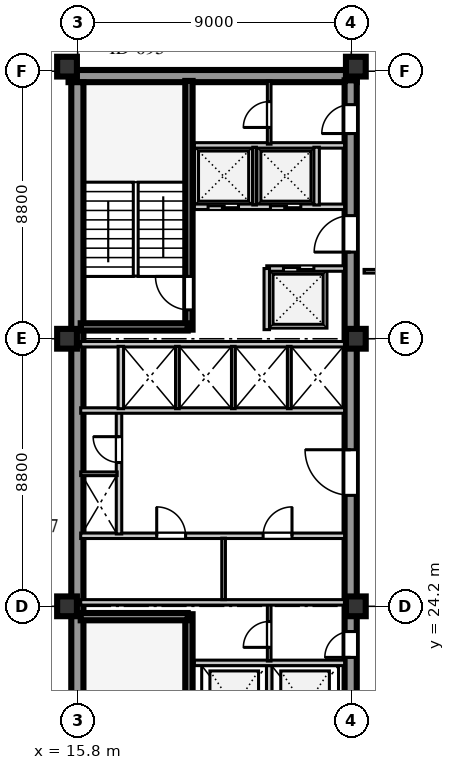
"""IFC4 building model, lengths in metres.
Left out: names, types, materials, properties, quantities, classifications, styles, units other than length and angle.
Written with IfcOpenShell. Run it as: python <this file> out.ifc"""

import sys

from ifc_helpers import new_model, si_unit, direction, frame, frame_2d, origin, origin_2d, place, context, subcontext, project, spatial, rectangle, extrude, element, fill, save


model = new_model("IFC4")
c1 = context("Model", 3, precision=1e-05, world=origin(), true_north=direction((0.0, 1.0)))
c2 = subcontext(c1, "Body", "Model", "MODEL_VIEW")
j1 = project(units=[si_unit("LENGTHUNIT", "METRE"), si_unit("PLANEANGLEUNIT", "RADIAN")], contexts=[c1])
p1 = place(None, origin())
s1 = spatial("IfcSite", under=j1, at=p1, CompositionType="ELEMENT")
p2 = place(p1, origin())
s2 = spatial("IfcBuilding", under=s1, at=p2, CompositionType="ELEMENT")
p3 = place(p2, frame((0.0, 0.0, 214.1)))
s3 = spatial("IfcBuildingStorey", under=s2, at=p3, CompositionType="ELEMENT", Elevation=214.1)
p4 = place(p3, frame((15.5, 41.64, 0.0), z_axis=(0.0, 0.0, 1.0), x_axis=(1.0, 0.0, 0.0)))
e1 = element("IfcWall", 1, at=p4, inside=s3, PredefinedType="SHEAR", context=c2, shape_type="SweptSolid", body=[
    extrude(rectangle(XDim=9.48, YDim=0.4, at=frame_2d((4.74, 0.0))), origin(), (0.0, 0.0, 1.0), 3.66),
])
p5 = place(p3, frame((15.79, 15.81, 0.0), z_axis=(0.0, 0.0, 1.0), x_axis=(0.0, 1.0, 0.0)))
e2 = element("IfcWall", 2, at=p5, inside=s3, PredefinedType="SHEAR", context=c2, shape_type="SweptSolid", body=[
    extrude(rectangle(XDim=25.63, YDim=0.4, at=frame_2d((12.815, 0.0))), origin(), (0.0, 0.0, 1.0), 3.66),
])
p6 = place(p3, frame((24.78, 15.74, 0.0), z_axis=(0.0, 0.0, 1.0), x_axis=(0.0, 1.0, 0.0)))
e3 = element("IfcWall", 3, at=p6, inside=s3, PredefinedType="SHEAR", context=c2, shape_type="SweptSolid", body=[
    extrude(rectangle(XDim=25.76, YDim=0.4, at=frame_2d((12.88, 0.0))), origin(), (0.0, 0.0, 1.0), 3.66),
])
p7 = place(p6, frame((1.61, 0.0, 0.0)))
e4 = element("IfcOpeningElement", 4, at=p7, cuts=e3, PredefinedType="OPENING", context=c2, shape_type="SweptSolid", body=[
    extrude(rectangle(XDim=1.2, YDim=2.1, at=frame_2d((0.6, 1.05))), frame((0.0, 0.21, 0.0), z_axis=(0.0, -1.0, 0.0), x_axis=(1.0, 0.0, 0.0)), (0.0, 0.0, 1.0), 0.42),
])
p8 = place(p6, frame((6.78, 0.0, 0.0)))
e5 = element("IfcOpeningElement", 5, at=p8, cuts=e3, PredefinedType="OPENING", context=c2, shape_type="SweptSolid", body=[
    extrude(rectangle(XDim=0.85, YDim=2.06, at=frame_2d((0.425, 1.03))), frame((0.0, 0.21, 0.0), z_axis=(0.0, -1.0, 0.0), x_axis=(1.0, 0.0, 0.0)), (0.0, 0.0, 1.0), 0.42),
])
p9 = place(p6, frame((12.11, 0.0, 0.0)))
e6 = element("IfcOpeningElement", 6, at=p9, cuts=e3, PredefinedType="OPENING", context=c2, shape_type="SweptSolid", body=[
    extrude(rectangle(XDim=1.5, YDim=2.12, at=frame_2d((0.75, 1.06))), frame((0.0, 0.21, 0.0), z_axis=(0.0, -1.0, 0.0), x_axis=(1.0, 0.0, 0.0)), (0.0, 0.0, 1.0), 0.42),
])
p10 = place(p6, frame((20.11, 0.0, 0.0)))
e7 = element("IfcOpeningElement", 7, at=p10, cuts=e3, PredefinedType="OPENING", context=c2, shape_type="SweptSolid", body=[
    extrude(rectangle(XDim=1.2, YDim=2.12, at=frame_2d((0.6, 1.06))), frame((0.0, 0.21, 0.0), z_axis=(0.0, -1.0, 0.0), x_axis=(1.0, 0.0, 0.0)), (0.0, 0.0, 1.0), 0.42),
])
p11 = place(p6, frame((24.01, 0.0, 0.0)))
e8 = element("IfcOpeningElement", 8, at=p11, cuts=e3, PredefinedType="OPENING", context=c2, shape_type="SweptSolid", body=[
    extrude(rectangle(XDim=0.95, YDim=2.1, at=frame_2d((0.475, 1.05))), frame((0.0, 0.21, 0.0), z_axis=(0.0, -1.0, 0.0), x_axis=(1.0, 0.0, 0.0)), (0.0, 0.0, 1.0), 0.42),
])
for number, where, z_axis, x_axis in (
    (9, (15.45, 24.2, 0.0), (0.0, 0.0, 1.0), (1.0, 0.0, 0.0)),
    (10, (15.45, 33.0, 0.0), (0.0, 0.0, 1.0), (1.0, 0.0, 0.0)),
    (11, (15.45, 41.95, 0.0), (0.0, 0.0, 1.0), (1.0, 0.0, 0.0)),
    (12, (24.95, 24.2, 0.0), (0.0, 0.0, 1.0), (1.0, 0.0, 0.0)),
    (13, (24.95, 33.0, 0.0), (0.0, 0.0, 1.0), (1.0, 0.0, 0.0)),
    (14, (24.95, 41.95, 0.0), (0.0, 0.0, 1.0), (1.0, 0.0, 0.0)),
):
    element("IfcColumn", number, at=place(p3, frame(where, z_axis=z_axis, x_axis=x_axis)), inside=s3, PredefinedType="COLUMN", context=c2, shape_type="SweptSolid", body=[
        extrude(rectangle(XDim=0.65, YDim=0.65, at=origin_2d()), origin(), (0.0, 0.0, 1.0), 3.66),
    ])
p12 = place(p3, frame((19.46, 15.74, 0.0), z_axis=(0.0, 0.0, 1.0), x_axis=(0.0, 1.0, 0.0)))
e15 = element("IfcWall", 15, at=p12, inside=s3, PredefinedType="SHEAR", context=c2, shape_type="SweptSolid", body=[
    extrude(rectangle(XDim=8.2, YDim=0.24, at=frame_2d((4.1, 0.0))), origin(), (0.0, 0.0, 1.0), 3.9),
])
p13 = place(p12, frame((0.45, 0.0, 0.0)))
e16 = element("IfcOpeningElement", 16, at=p13, cuts=e15, PredefinedType="OPENING", context=c2, shape_type="SweptSolid", body=[
    extrude(rectangle(XDim=1.1, YDim=2.1, at=frame_2d((0.55, 1.05))), frame((0.0, 0.13, 0.0), z_axis=(0.0, -1.0, 0.0), x_axis=(1.0, 0.0, 0.0)), (0.0, 0.0, 1.0), 0.26),
])
p14 = place(p3, frame((15.9, 23.86, 0.0), z_axis=(0.0, 0.0, 1.0), x_axis=(1.0, 0.0, 0.0)))
e17 = element("IfcWall", 17, at=p14, inside=s3, PredefinedType="SHEAR", context=c2, shape_type="SweptSolid", body=[
    extrude(rectangle(XDim=3.52, YDim=0.24, at=frame_2d((1.76, 0.0))), origin(), (0.0, 0.0, 1.0), 3.9),
])
p15 = place(p3, frame((22.1, 19.51, 0.0), z_axis=(0.0, 0.0, 1.0), x_axis=(0.0, 1.0, 0.0)))
e18 = element("IfcWall", 18, at=p15, inside=s3, PredefinedType="SOLIDWALL", context=c2, shape_type="SweptSolid", body=[
    extrude(rectangle(XDim=2.74, YDim=0.18, at=frame_2d((1.37, 0.0))), origin(), (0.0, 0.0, 1.0), 3.66),
])
p16 = place(p3, frame((19.64, 22.34, 0.0), z_axis=(0.0, 0.0, 1.0), x_axis=(1.0, 0.0, 0.0)))
e19 = element("IfcWall", 19, at=p16, inside=s3, PredefinedType="SOLIDWALL", context=c2, shape_type="SweptSolid", body=[
    extrude(rectangle(XDim=4.94, YDim=0.18, at=frame_2d((2.47, 0.0))), origin(), (0.0, 0.0, 1.0), 3.66),
])
p17 = place(p3, frame((22.1, 22.4, 0.0), z_axis=(0.0, 0.0, 1.0), x_axis=(0.0, 1.0, 0.0)))
e20 = element("IfcWall", 20, at=p17, inside=s3, PredefinedType="PARTITIONING", context=c2, shape_type="SweptSolid", body=[
    extrude(rectangle(XDim=1.88, YDim=0.12, at=frame_2d((0.94, 0.0))), origin(), (0.0, 0.0, 1.0), 3.66),
])
p18 = place(p17, frame((0.45, 0.0, 0.0)))
e21 = element("IfcOpeningElement", 21, at=p18, cuts=e20, PredefinedType="OPENING", context=c2, shape_type="SweptSolid", body=[
    extrude(rectangle(XDim=0.85, YDim=2.06, at=frame_2d((0.425, 1.03))), frame((0.0, 0.07, 0.0), z_axis=(0.0, -1.0, 0.0), x_axis=(1.0, 0.0, 0.0)), (0.0, 0.0, 1.0), 0.14),
])
p19 = place(p3, frame((15.9, 26.52, 0.0), z_axis=(0.0, 0.0, 1.0), x_axis=(1.0, 0.0, 0.0)))
e22 = element("IfcWall", 22, at=p19, inside=s3, PredefinedType="SOLIDWALL", context=c2, shape_type="SweptSolid", body=[
    extrude(rectangle(XDim=8.68, YDim=0.18, at=frame_2d((4.34, 0.0))), origin(), (0.0, 0.0, 1.0), 3.66),
])
p20 = place(p19, frame((2.5, 0.0, 0.0)))
e23 = element("IfcOpeningElement", 23, at=p20, cuts=e22, PredefinedType="OPENING", context=c2, shape_type="SweptSolid", body=[
    extrude(rectangle(XDim=0.95, YDim=2.1, at=frame_2d((0.475, 1.05))), frame((0.0, 0.1, 0.0), z_axis=(0.0, -1.0, 0.0), x_axis=(1.0, 0.0, 0.0)), (0.0, 0.0, 1.0), 0.2),
])
p21 = place(p19, frame((6.0, 0.0, 0.0)))
e24 = element("IfcOpeningElement", 24, at=p21, cuts=e22, PredefinedType="OPENING", context=c2, shape_type="SweptSolid", body=[
    extrude(rectangle(XDim=0.95, YDim=2.1, at=frame_2d((0.475, 1.05))), frame((0.0, 0.1, 0.0), z_axis=(0.0, -1.0, 0.0), x_axis=(1.0, 0.0, 0.0)), (0.0, 0.0, 1.0), 0.2),
])
p22 = place(p3, frame((15.9, 24.33, 0.0), z_axis=(0.0, 0.0, 1.0), x_axis=(1.0, 0.0, 0.0)))
e25 = element("IfcWall", 25, at=p22, inside=s3, PredefinedType="SOLIDWALL", context=c2, shape_type="SweptSolid", body=[
    extrude(rectangle(XDim=8.68, YDim=0.18, at=frame_2d((4.34, 0.0))), origin(), (0.0, 0.0, 1.0), 3.06),
])
p23 = place(p3, frame((20.6, 24.42, 0.0), z_axis=(0.0, 0.0, 1.0), x_axis=(0.0, 1.0, 0.0)))
e26 = element("IfcWall", 26, at=p23, inside=s3, PredefinedType="PARTITIONING", context=c2, shape_type="SweptSolid", body=[
    extrude(rectangle(XDim=2.02, YDim=0.12, at=frame_2d((1.01, 0.0))), origin(), (0.0, 0.0, 1.0), 3.66),
])
p24 = place(p3, frame((17.16, 26.58, 0.0), z_axis=(0.0, 0.0, 1.0), x_axis=(0.0, 1.0, 0.0)))
e27 = element("IfcWall", 27, at=p24, inside=s3, PredefinedType="SOLIDWALL", context=c2, shape_type="SweptSolid", body=[
    extrude(rectangle(XDim=4.02, YDim=0.18, at=frame_2d((2.01, 0.0))), origin(), (0.0, 0.0, 1.0), 3.66),
])
p25 = place(p24, frame((2.35, 0.0, 0.0)))
e28 = element("IfcOpeningElement", 28, at=p25, cuts=e27, PredefinedType="OPENING", context=c2, shape_type="SweptSolid", body=[
    extrude(rectangle(XDim=0.85, YDim=2.06, at=frame_2d((0.425, 1.03))), frame((0.0, 0.1, 0.0), z_axis=(0.0, -1.0, 0.0), x_axis=(1.0, 0.0, 0.0)), (0.0, 0.0, 1.0), 0.2),
])
p26 = place(p3, frame((15.9, 28.56, 0.0), z_axis=(0.0, 0.0, 1.0), x_axis=(1.0, 0.0, 0.0)))
e29 = element("IfcWall", 29, at=p26, inside=s3, PredefinedType="PARTITIONING", context=c2, shape_type="SweptSolid", body=[
    extrude(rectangle(XDim=1.2, YDim=0.12, at=frame_2d((0.6, 0.0))), origin(), (0.0, 0.0, 1.0), 3.66),
])
p27 = place(p3, frame((15.9, 30.64, 0.0), z_axis=(0.0, 0.0, 1.0), x_axis=(1.0, 0.0, 0.0)))
e30 = element("IfcWall", 30, at=p27, inside=s3, PredefinedType="SOLIDWALL", context=c2, shape_type="SweptSolid", body=[
    extrude(rectangle(XDim=8.68, YDim=0.18, at=frame_2d((4.34, 0.0))), origin(), (0.0, 0.0, 1.0), 3.66),
])
p28 = place(p3, frame((15.9, 32.82, 0.0), z_axis=(0.0, 0.0, 1.0), x_axis=(1.0, 0.0, 0.0)))
e31 = element("IfcWall", 31, at=p28, inside=s3, PredefinedType="SOLIDWALL", context=c2, shape_type="SweptSolid", body=[
    extrude(rectangle(XDim=8.68, YDim=0.18, at=frame_2d((4.34, 0.0))), origin(), (0.0, 0.0, 1.0), 3.06),
])
p29 = place(p3, frame((17.22, 30.7, 0.0), z_axis=(0.0, 0.0, 1.0), x_axis=(0.0, 1.0, 0.0)))
e32 = element("IfcWall", 32, at=p29, inside=s3, PredefinedType="SOLIDWALL", context=c2, shape_type="SweptSolid", body=[
    extrude(rectangle(XDim=2.05, YDim=0.18, at=frame_2d((1.025, 0.0))), origin(), (0.0, 0.0, 1.0), 3.66),
])
for number, where, z_axis, x_axis in (
    (33, (19.08, 30.7, 0.0), (0.0, 0.0, 1.0), (0.0, 1.0, 0.0)),
    (34, (20.92, 30.7, 0.0), (0.0, 0.0, 1.0), (0.0, 1.0, 0.0)),
    (35, (22.76, 30.7, 0.0), (0.0, 0.0, 1.0), (0.0, 1.0, 0.0)),
):
    element("IfcWall", number, at=place(p3, frame(where, z_axis=z_axis, x_axis=x_axis)), inside=s3, PredefinedType="PARTITIONING", context=c2, shape_type="SweptSolid", body=[
        extrude(rectangle(XDim=2.05, YDim=0.12, at=frame_2d((1.025, 0.0))), origin(), (0.0, 0.0, 1.0), 3.66),
    ])
p30 = place(p3, frame((19.46, 33.3, 0.0), z_axis=(0.0, 0.0, 1.0), x_axis=(0.0, 1.0, 0.0)))
e36 = element("IfcWall", 36, at=p30, inside=s3, PredefinedType="SHEAR", context=c2, shape_type="SweptSolid", body=[
    extrude(rectangle(XDim=8.18, YDim=0.24, at=frame_2d((4.09, 0.0))), origin(), (0.0, 0.0, 1.0), 3.9),
])
p31 = place(p30, frame((0.65, 0.0, 0.0)))
e37 = element("IfcOpeningElement", 37, at=p31, cuts=e36, PredefinedType="OPENING", context=c2, shape_type="SweptSolid", body=[
    extrude(rectangle(XDim=1.1, YDim=2.1, at=frame_2d((0.55, 1.05))), frame((0.0, 0.13, 0.0), z_axis=(0.0, -1.0, 0.0), x_axis=(1.0, 0.0, 0.0)), (0.0, 0.0, 1.0), 0.26),
])
p32 = place(p3, frame((15.9, 33.39, 0.0), z_axis=(0.0, 0.0, 1.0), x_axis=(1.0, 0.0, 0.0)))
e38 = element("IfcWall", 38, at=p32, inside=s3, PredefinedType="SHEAR", context=c2, shape_type="SweptSolid", body=[
    extrude(rectangle(XDim=3.52, YDim=0.24, at=frame_2d((1.76, 0.0))), origin(), (0.0, 0.0, 1.0), 3.9),
])
p33 = place(p3, frame((22.02, 35.31, 0.0), z_axis=(0.0, 0.0, 1.0), x_axis=(1.0, 0.0, 0.0)))
e39 = element("IfcWall", 39, at=p33, inside=s3, PredefinedType="SOLIDWALL", context=c2, shape_type="SweptSolid", body=[
    extrude(rectangle(XDim=2.56, YDim=0.18, at=frame_2d((1.28, 0.0))), origin(), (0.0, 0.0, 1.0), 3.66),
])
p34 = place(p33, frame((0.55, 0.0, 0.0)))
e40 = element("IfcOpeningElement", 40, at=p34, cuts=e39, PredefinedType="OPENING", context=c2, shape_type="SweptSolid", body=[
    extrude(rectangle(XDim=1.0, YDim=2.1, at=frame_2d((0.5, 1.05))), frame((0.0, 0.1, 0.0), z_axis=(0.0, -1.0, 0.0), x_axis=(1.0, 0.0, 0.0)), (0.0, 0.0, 1.0), 0.2),
])
p35 = place(p3, frame((22.02, 33.3, 0.0), z_axis=(0.0, 0.0, 1.0), x_axis=(0.0, 1.0, 0.0)))
e41 = element("IfcWall", 41, at=p35, inside=s3, PredefinedType="SOLIDWALL", context=c2, shape_type="SweptSolid", body=[
    extrude(rectangle(XDim=2.01, YDim=0.18, at=frame_2d((1.005, 0.0))), origin(), (0.0, 0.0, 1.0), 3.66),
])
p36 = place(p3, frame((19.64, 37.34, 0.0), z_axis=(0.0, 0.0, 1.0), x_axis=(1.0, 0.0, 0.0)))
e42 = element("IfcWall", 42, at=p36, inside=s3, PredefinedType="SOLIDWALL", context=c2, shape_type="SweptSolid", body=[
    extrude(rectangle(XDim=4.94, YDim=0.18, at=frame_2d((2.47, 0.0))), origin(), (0.0, 0.0, 1.0), 3.66),
])
p37 = place(p36, frame((0.45, 0.0, 0.0)))
e43 = element("IfcOpeningElement", 43, at=p37, cuts=e42, PredefinedType="OPENING", context=c2, shape_type="SweptSolid", body=[
    extrude(rectangle(XDim=1.0, YDim=2.1, at=frame_2d((0.5, 1.05))), frame((0.0, 0.1, 0.0), z_axis=(0.0, -1.0, 0.0), x_axis=(1.0, 0.0, 0.0)), (0.0, 0.0, 1.0), 0.2),
])
p38 = place(p36, frame((2.5, 0.0, 0.0)))
e44 = element("IfcOpeningElement", 44, at=p38, cuts=e42, PredefinedType="OPENING", context=c2, shape_type="SweptSolid", body=[
    extrude(rectangle(XDim=1.0, YDim=2.1, at=frame_2d((0.5, 1.05))), frame((0.0, 0.1, 0.0), z_axis=(0.0, -1.0, 0.0), x_axis=(1.0, 0.0, 0.0)), (0.0, 0.0, 1.0), 0.2),
])
p39 = place(p3, frame((19.64, 39.36, 0.0), z_axis=(0.0, 0.0, 1.0), x_axis=(1.0, 0.0, 0.0)))
e45 = element("IfcWall", 45, at=p39, inside=s3, PredefinedType="SOLIDWALL", context=c2, shape_type="SweptSolid", body=[
    extrude(rectangle(XDim=4.94, YDim=0.18, at=frame_2d((2.47, 0.0))), origin(), (0.0, 0.0, 1.0), 3.66),
])
p40 = place(p3, frame((21.62, 37.4, 0.0), z_axis=(0.0, 0.0, 1.0), x_axis=(0.0, 1.0, 0.0)))
e46 = element("IfcWall", 46, at=p40, inside=s3, PredefinedType="PARTITIONING", context=c2, shape_type="SweptSolid", body=[
    extrude(rectangle(XDim=1.9, YDim=0.12, at=frame_2d((0.95, 0.0))), origin(), (0.0, 0.0, 1.0), 3.66),
])
p41 = place(p3, frame((23.66, 37.4, 0.0), z_axis=(0.0, 0.0, 1.0), x_axis=(0.0, 1.0, 0.0)))
e47 = element("IfcWall", 47, at=p41, inside=s3, PredefinedType="SOLIDWALL", context=c2, shape_type="SweptSolid", body=[
    extrude(rectangle(XDim=1.9, YDim=0.18, at=frame_2d((0.95, 0.0))), origin(), (0.0, 0.0, 1.0), 3.66),
])
p42 = place(p3, frame((22.1, 39.4, 0.0), z_axis=(0.0, 0.0, 1.0), x_axis=(0.0, 1.0, 0.0)))
e48 = element("IfcWall", 48, at=p42, inside=s3, PredefinedType="PARTITIONING", context=c2, shape_type="SweptSolid", body=[
    extrude(rectangle(XDim=2.08, YDim=0.12, at=frame_2d((1.04, 0.0))), origin(), (0.0, 0.0, 1.0), 3.66),
])
p43 = place(p42, frame((0.55, 0.0, 0.0)))
e49 = element("IfcOpeningElement", 49, at=p43, cuts=e48, PredefinedType="OPENING", context=c2, shape_type="SweptSolid", body=[
    extrude(rectangle(XDim=0.85, YDim=2.06, at=frame_2d((0.425, 1.03))), frame((0.0, 0.07, 0.0), z_axis=(0.0, -1.0, 0.0), x_axis=(1.0, 0.0, 0.0)), (0.0, 0.0, 1.0), 0.14),
])
p44 = place(p3, frame((25.22, 35.22, 0.0), z_axis=(0.0, 0.0, 1.0), x_axis=(1.0, 0.0, 0.0)))
e50 = element("IfcWall", 50, at=p44, inside=s3, PredefinedType="PARTITIONING", context=c2, shape_type="SweptSolid", body=[
    extrude(rectangle(XDim=9.5, YDim=0.12, at=frame_2d((4.75, 0.0))), origin(), (0.0, 0.0, 1.0), 3.66),
])
p45 = place(p44, frame((1.1, 0.0, 0.0)))
e51 = element("IfcOpeningElement", 51, at=p45, cuts=e50, PredefinedType="OPENING", context=c2, shape_type="SweptSolid", body=[
    extrude(rectangle(XDim=0.95, YDim=2.1, at=frame_2d((0.475, 1.05))), frame((0.0, 0.07, 0.0), z_axis=(0.0, -1.0, 0.0), x_axis=(1.0, 0.0, 0.0)), (0.0, 0.0, 1.0), 0.14),
])
p46 = place(p18, origin())
e52 = element("IfcDoor", 52, at=p46, inside=s3, OperationType="SINGLE_SWING_LEFT", PredefinedType="DOOR", context=c2, shape_type="SweptSolid", body=[
    extrude(rectangle(XDim=0.85, YDim=2.06, at=frame_2d((0.425, 1.03))), frame((0.0, 0.025, 0.0), z_axis=(0.0, -1.0, 0.0), x_axis=(1.0, 0.0, 0.0)), (0.0, 0.0, 1.0), 0.05),
])
fill(e21, e52)
p47 = place(p8, frame((0.85, 0.0, 0.0), z_axis=(0.0, 0.0, 1.0), x_axis=(-1.0, 0.0, 0.0)))
e53 = element("IfcDoor", 53, at=p47, inside=s3, OperationType="SINGLE_SWING_RIGHT", PredefinedType="DOOR", context=c2, shape_type="SweptSolid", body=[
    extrude(rectangle(XDim=0.85, YDim=2.06, at=frame_2d((0.425, 1.03))), frame((0.0, 0.025, 0.0), z_axis=(0.0, -1.0, 0.0), x_axis=(1.0, 0.0, 0.0)), (0.0, 0.0, 1.0), 0.05),
])
fill(e5, e53)
p48 = place(p20, origin())
e54 = element("IfcDoor", 54, at=p48, inside=s3, OperationType="SINGLE_SWING_LEFT", PredefinedType="DOOR", context=c2, shape_type="SweptSolid", body=[
    extrude(rectangle(XDim=0.95, YDim=2.1, at=frame_2d((0.475, 1.05))), frame((0.0, 0.025, 0.0), z_axis=(0.0, -1.0, 0.0), x_axis=(1.0, 0.0, 0.0)), (0.0, 0.0, 1.0), 0.05),
])
fill(e23, e54)
p49 = place(p21, origin())
e55 = element("IfcDoor", 55, at=p49, inside=s3, OperationType="SINGLE_SWING_RIGHT", PredefinedType="DOOR", context=c2, shape_type="SweptSolid", body=[
    extrude(rectangle(XDim=0.95, YDim=2.1, at=frame_2d((0.475, 1.05))), frame((0.0, 0.025, 0.0), z_axis=(0.0, -1.0, 0.0), x_axis=(1.0, 0.0, 0.0)), (0.0, 0.0, 1.0), 0.05),
])
fill(e24, e55)
p50 = place(p25, origin())
e56 = element("IfcDoor", 56, at=p50, inside=s3, OperationType="SINGLE_SWING_RIGHT", PredefinedType="DOOR", context=c2, shape_type="SweptSolid", body=[
    extrude(rectangle(XDim=0.85, YDim=2.06, at=frame_2d((0.425, 1.03))), frame((0.0, 0.025, 0.0), z_axis=(0.0, -1.0, 0.0), x_axis=(1.0, 0.0, 0.0)), (0.0, 0.0, 1.0), 0.05),
])
fill(e28, e56)
p51 = place(p9, frame((1.5, 0.0, 0.0), z_axis=(0.0, 0.0, 1.0), x_axis=(-1.0, 0.0, 0.0)))
e57 = element("IfcDoor", 57, at=p51, inside=s3, OperationType="SINGLE_SWING_LEFT", PredefinedType="DOOR", context=c2, shape_type="SweptSolid", body=[
    extrude(rectangle(XDim=1.5, YDim=2.12, at=frame_2d((0.75, 1.06))), frame((0.0, 0.025, 0.0), z_axis=(0.0, -1.0, 0.0), x_axis=(1.0, 0.0, 0.0)), (0.0, 0.0, 1.0), 0.05),
])
fill(e6, e57)
p52 = place(p31, origin())
e58 = element("IfcDoor", 58, at=p52, inside=s3, OperationType="SINGLE_SWING_RIGHT", PredefinedType="DOOR", context=c2, shape_type="SweptSolid", body=[
    extrude(rectangle(XDim=1.1, YDim=2.1, at=frame_2d((0.55, 1.05))), frame((0.0, 0.025, 0.0), z_axis=(0.0, -1.0, 0.0), x_axis=(1.0, 0.0, 0.0)), (0.0, 0.0, 1.0), 0.05),
])
fill(e37, e58)
p53 = place(p10, frame((1.2, 0.0, 0.0), z_axis=(0.0, 0.0, 1.0), x_axis=(-1.0, 0.0, 0.0)))
e59 = element("IfcDoor", 59, at=p53, inside=s3, OperationType="SINGLE_SWING_RIGHT", PredefinedType="DOOR", context=c2, shape_type="SweptSolid", body=[
    extrude(rectangle(XDim=1.2, YDim=2.12, at=frame_2d((0.6, 1.06))), frame((0.0, 0.025, 0.0), z_axis=(0.0, -1.0, 0.0), x_axis=(1.0, 0.0, 0.0)), (0.0, 0.0, 1.0), 0.05),
])
fill(e7, e59)
p54 = place(p37, frame((1.0, 0.0, 0.0), z_axis=(0.0, 0.0, 1.0), x_axis=(-1.0, 0.0, 0.0)))
e60 = element("IfcDoor", 60, at=p54, inside=s3, OperationType="DOUBLE_DOOR_SLIDING", PredefinedType="DOOR", context=c2, shape_type="SweptSolid", body=[
    extrude(rectangle(XDim=1.0, YDim=2.1, at=frame_2d((0.5, 1.05))), frame((0.0, 0.025, 0.0), z_axis=(0.0, -1.0, 0.0), x_axis=(1.0, 0.0, 0.0)), (0.0, 0.0, 1.0), 0.05),
])
fill(e43, e60)
p55 = place(p38, frame((1.0, 0.0, 0.0), z_axis=(0.0, 0.0, 1.0), x_axis=(-1.0, 0.0, 0.0)))
e61 = element("IfcDoor", 61, at=p55, inside=s3, OperationType="DOUBLE_DOOR_SLIDING", PredefinedType="DOOR", context=c2, shape_type="SweptSolid", body=[
    extrude(rectangle(XDim=1.0, YDim=2.1, at=frame_2d((0.5, 1.05))), frame((0.0, 0.025, 0.0), z_axis=(0.0, -1.0, 0.0), x_axis=(1.0, 0.0, 0.0)), (0.0, 0.0, 1.0), 0.05),
])
fill(e44, e61)
p56 = place(p34, origin())
e62 = element("IfcDoor", 62, at=p56, inside=s3, OperationType="DOUBLE_DOOR_SLIDING", PredefinedType="DOOR", context=c2, shape_type="SweptSolid", body=[
    extrude(rectangle(XDim=1.0, YDim=2.1, at=frame_2d((0.5, 1.05))), frame((0.0, 0.025, 0.0), z_axis=(0.0, -1.0, 0.0), x_axis=(1.0, 0.0, 0.0)), (0.0, 0.0, 1.0), 0.05),
])
fill(e40, e62)
p57 = place(p43, origin())
e63 = element("IfcDoor", 63, at=p57, inside=s3, OperationType="SINGLE_SWING_LEFT", PredefinedType="DOOR", context=c2, shape_type="SweptSolid", body=[
    extrude(rectangle(XDim=0.85, YDim=2.06, at=frame_2d((0.425, 1.03))), frame((0.0, 0.025, 0.0), z_axis=(0.0, -1.0, 0.0), x_axis=(1.0, 0.0, 0.0)), (0.0, 0.0, 1.0), 0.05),
])
fill(e49, e63)
p58 = place(p11, frame((0.95, 0.0, 0.0), z_axis=(0.0, 0.0, 1.0), x_axis=(-1.0, 0.0, 0.0)))
e64 = element("IfcDoor", 64, at=p58, inside=s3, OperationType="SINGLE_SWING_RIGHT", PredefinedType="DOOR", context=c2, shape_type="SweptSolid", body=[
    extrude(rectangle(XDim=0.95, YDim=2.1, at=frame_2d((0.475, 1.05))), frame((0.0, 0.025, 0.0), z_axis=(0.0, -1.0, 0.0), x_axis=(1.0, 0.0, 0.0)), (0.0, 0.0, 1.0), 0.05),
])
fill(e8, e64)
save(model, sys.argv[1])
